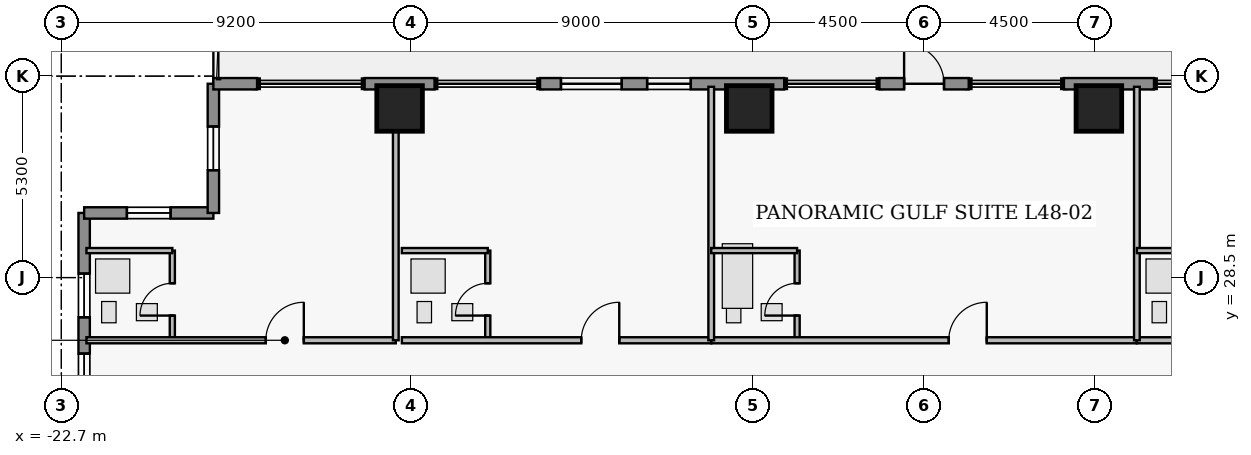
"""IFC4 building model, lengths in metres.
Left out: names, types, materials, properties, quantities, classifications, styles, units other than length and angle.
Written with IfcOpenShell. Run it as: python <this file> out.ifc"""

import sys

from ifc_helpers import new_model, si_unit, direction, frame, frame_2d, origin, origin_2d, place, context, subcontext, project, spatial, rectangle, extrude, element, fill, save


model = new_model("IFC4")
c1 = context("Model", 3, precision=1e-05, world=origin(), true_north=direction((0.0, 1.0)))
c2 = subcontext(c1, "Body", "Model", "MODEL_VIEW")
j1 = project(units=[si_unit("LENGTHUNIT", "METRE"), si_unit("PLANEANGLEUNIT", "RADIAN")], contexts=[c1])
p1 = place(None, origin())
s1 = spatial("IfcSite", under=j1, at=p1, CompositionType="ELEMENT")
p2 = place(p1, origin())
s2 = spatial("IfcBuilding", under=s1, at=p2, CompositionType="ELEMENT")
p3 = place(p2, frame((0.0, 0.0, 192.4)))
s3 = spatial("IfcBuildingStorey", under=s2, at=p3, CompositionType="ELEMENT", Elevation=192.4)
for number, where, z_axis, x_axis in (
    (1, (-13.8, 32.95, 0.0), (0.0, 0.0, 1.0), (1.0, 0.0, 0.0)),
    (2, (-4.6, 32.95, 0.0), (0.0, 0.0, 1.0), (1.0, 0.0, 0.0)),
    (3, (4.6, 32.95, 0.0), (0.0, 0.0, 1.0), (1.0, 0.0, 0.0)),
):
    element("IfcColumn", number, at=place(p3, frame(where, z_axis=z_axis, x_axis=x_axis)), inside=s3, PredefinedType="COLUMN", context=c2, shape_type="SweptSolid", body=[
        extrude(rectangle(XDim=1.2, YDim=1.2, at=origin_2d()), origin(), (0.0, 0.0, 1.0), 3.75),
    ])
p4 = place(p3, frame((-22.1, 24.55, 0.0), z_axis=(0.0, 0.0, 1.0), x_axis=(0.0, 1.0, 0.0)))
e4 = element("IfcWall", 4, at=p4, inside=s3, PredefinedType="STANDARD", context=c2, shape_type="SweptSolid", body=[
    extrude(rectangle(XDim=5.65, YDim=0.3, at=frame_2d((2.825, 0.0))), origin(), (0.0, 0.0, 1.0), 3.53),
])
p5 = place(p4, frame((0.8, 0.0, 0.95)))
e5 = element("IfcOpeningElement", 5, at=p5, cuts=e4, PredefinedType="OPENING", context=c2, shape_type="SweptSolid", body=[
    extrude(rectangle(XDim=1.15, YDim=1.55, at=frame_2d((0.575, 0.775))), frame((0.0, 0.16, 0.0), z_axis=(0.0, -1.0, 0.0), x_axis=(1.0, 0.0, 0.0)), (0.0, 0.0, 1.0), 0.32),
])
p6 = place(p4, frame((2.905, 0.0, 0.95)))
e6 = element("IfcOpeningElement", 6, at=p6, cuts=e4, PredefinedType="OPENING", context=c2, shape_type="SweptSolid", body=[
    extrude(rectangle(XDim=1.15, YDim=1.55, at=frame_2d((0.575, 0.775))), frame((0.0, 0.16, 0.0), z_axis=(0.0, -1.0, 0.0), x_axis=(1.0, 0.0, 0.0)), (0.0, 0.0, 1.0), 0.32),
])
p7 = place(p3, frame((-22.1, 30.2, 0.0), z_axis=(0.0, 0.0, 1.0), x_axis=(1.0, 0.0, 0.0)))
e7 = element("IfcWall", 7, at=p7, inside=s3, PredefinedType="STANDARD", context=c2, shape_type="SweptSolid", body=[
    extrude(rectangle(XDim=3.4, YDim=0.3, at=frame_2d((1.7, 0.0))), origin(), (0.0, 0.0, 1.0), 3.53),
])
p8 = place(p7, frame((1.125, 0.0, 1.25)))
e8 = element("IfcOpeningElement", 8, at=p8, cuts=e7, PredefinedType="OPENING", context=c2, shape_type="SweptSolid", body=[
    extrude(rectangle(XDim=1.15, YDim=1.55, at=frame_2d((0.575, 0.775))), frame((0.0, 0.16, 0.0), z_axis=(0.0, -1.0, 0.0), x_axis=(1.0, 0.0, 0.0)), (0.0, 0.0, 1.0), 0.32),
])
p9 = place(p3, frame((-18.7, 30.2, 0.0), z_axis=(0.0, 0.0, 1.0), x_axis=(0.0, 1.0, 0.0)))
e9 = element("IfcWall", 9, at=p9, inside=s3, PredefinedType="STANDARD", context=c2, shape_type="SweptSolid", body=[
    extrude(rectangle(XDim=3.4, YDim=0.3, at=frame_2d((1.7, 0.0))), origin(), (0.0, 0.0, 1.0), 3.53),
])
p10 = place(p9, frame((1.125, 0.0, 1.25)))
e10 = element("IfcOpeningElement", 10, at=p10, cuts=e9, PredefinedType="OPENING", context=c2, shape_type="SweptSolid", body=[
    extrude(rectangle(XDim=1.15, YDim=1.55, at=frame_2d((0.575, 0.775))), frame((0.0, 0.16, 0.0), z_axis=(0.0, -1.0, 0.0), x_axis=(1.0, 0.0, 0.0)), (0.0, 0.0, 1.0), 0.32),
])
p11 = place(p3, frame((-18.7, 33.6, 0.0), z_axis=(0.0, 0.0, 1.0), x_axis=(1.0, 0.0, 0.0)))
e11 = element("IfcWall", 11, at=p11, inside=s3, PredefinedType="STANDARD", context=c2, shape_type="SweptSolid", body=[
    extrude(rectangle(XDim=1.15, YDim=0.3, at=frame_2d((0.575, 0.0))), origin(), (0.0, 0.0, 1.0), 3.53),
])
p12 = place(p3, frame((-14.72, 33.6, 0.0), z_axis=(0.0, 0.0, 1.0), x_axis=(1.0, 0.0, 0.0)))
e12 = element("IfcWall", 12, at=p12, inside=s3, PredefinedType="STANDARD", context=c2, shape_type="SweptSolid", body=[
    extrude(rectangle(XDim=1.84, YDim=0.3, at=frame_2d((0.92, 0.0))), origin(), (0.0, 0.0, 1.0), 3.53),
])
p13 = place(p3, frame((-10.104, 33.6, 0.0), z_axis=(0.0, 0.0, 1.0), x_axis=(1.0, 0.0, 0.0)))
e13 = element("IfcWall", 13, at=p13, inside=s3, PredefinedType="STANDARD", context=c2, shape_type="SweptSolid", body=[
    extrude(rectangle(XDim=6.424, YDim=0.3, at=frame_2d((3.212, 0.0))), origin(), (0.0, 0.0, 1.0), 3.53),
])
p14 = place(p13, frame((0.55, 0.0, 0.85)))
e14 = element("IfcOpeningElement", 14, at=p14, cuts=e13, PredefinedType="OPENING", context=c2, shape_type="SweptSolid", body=[
    extrude(rectangle(XDim=1.6, YDim=1.8, at=frame_2d((0.8, 0.9))), frame((0.0, 0.16, 0.0), z_axis=(0.0, -1.0, 0.0), x_axis=(1.0, 0.0, 0.0)), (0.0, 0.0, 1.0), 0.32),
])
p15 = place(p13, frame((2.817, 0.0, 0.95)))
e15 = element("IfcOpeningElement", 15, at=p15, cuts=e13, PredefinedType="OPENING", context=c2, shape_type="SweptSolid", body=[
    extrude(rectangle(XDim=1.15, YDim=1.55, at=frame_2d((0.575, 0.775))), frame((0.0, 0.16, 0.0), z_axis=(0.0, -1.0, 0.0), x_axis=(1.0, 0.0, 0.0)), (0.0, 0.0, 1.0), 0.32),
])
p16 = place(p3, frame((-1.175, 33.6, 0.0), z_axis=(0.0, 0.0, 1.0), x_axis=(1.0, 0.0, 0.0)))
e16 = element("IfcWall", 16, at=p16, inside=s3, PredefinedType="STANDARD", context=c2, shape_type="SweptSolid", body=[
    extrude(rectangle(XDim=2.35, YDim=0.3, at=frame_2d((1.175, 0.0))), origin(), (0.0, 0.0, 1.0), 3.53),
])
p17 = place(p16, frame((0.65, 0.0, 0.0)))
e17 = element("IfcOpeningElement", 17, at=p17, cuts=e16, PredefinedType="OPENING", context=c2, shape_type="SweptSolid", body=[
    extrude(rectangle(XDim=1.05, YDim=2.2, at=frame_2d((0.525, 1.1))), frame((0.0, 0.16, 0.0), z_axis=(0.0, -1.0, 0.0), x_axis=(1.0, 0.0, 0.0)), (0.0, 0.0, 1.0), 0.32),
])
p18 = place(p3, frame((3.68, 33.6, 0.0), z_axis=(0.0, 0.0, 1.0), x_axis=(1.0, 0.0, 0.0)))
e18 = element("IfcWall", 18, at=p18, inside=s3, PredefinedType="STANDARD", context=c2, shape_type="SweptSolid", body=[
    extrude(rectangle(XDim=2.37, YDim=0.3, at=frame_2d((1.185, 0.0))), origin(), (0.0, 0.0, 1.0), 3.53),
])
p19 = place(p3, frame((-19.78, 26.85, 0.0), z_axis=(0.0, 0.0, 1.0), x_axis=(0.0, 1.0, 0.0)))
e19 = element("IfcWall", 19, at=p19, inside=s3, PredefinedType="PLUMBINGWALL", context=c2, shape_type="SweptSolid", body=[
    extrude(rectangle(XDim=2.36, YDim=0.135, at=frame_2d((1.18, 0.0))), origin(), (0.0, 0.0, 1.0), 3.53),
])
p20 = place(p19, frame((0.65, 0.0, 0.0)))
e20 = element("IfcOpeningElement", 20, at=p20, cuts=e19, PredefinedType="OPENING", context=c2, shape_type="SweptSolid", body=[
    extrude(rectangle(XDim=0.85, YDim=2.1, at=frame_2d((0.425, 1.05))), frame((0.0, 0.077, 0.0), z_axis=(0.0, -1.0, 0.0), x_axis=(1.0, 0.0, 0.0)), (0.0, 0.0, 1.0), 0.155),
])
p21 = place(p3, frame((-22.04, 26.85, 0.0), z_axis=(0.0, 0.0, 1.0), x_axis=(1.0, 0.0, 0.0)))
e21 = element("IfcWall", 21, at=p21, inside=s3, PredefinedType="PARTITIONING", context=c2, shape_type="SweptSolid", body=[
    extrude(rectangle(XDim=8.14, YDim=0.16, at=frame_2d((4.07, 0.0))), origin(), (0.0, 0.0, 1.0), 3.53),
])
p22 = place(p21, frame((4.72, 0.0, 0.0)))
e22 = element("IfcOpeningElement", 22, at=p22, cuts=e21, PredefinedType="OPENING", context=c2, shape_type="SweptSolid", body=[
    extrude(rectangle(XDim=1.0, YDim=2.15, at=frame_2d((0.5, 1.075))), frame((0.0, 0.09, 0.0), z_axis=(0.0, -1.0, 0.0), x_axis=(1.0, 0.0, 0.0)), (0.0, 0.0, 1.0), 0.18),
])
p23 = place(p3, frame((-11.48, 26.85, 0.0), z_axis=(0.0, 0.0, 1.0), x_axis=(0.0, 1.0, 0.0)))
e23 = element("IfcWall", 23, at=p23, inside=s3, PredefinedType="PLUMBINGWALL", context=c2, shape_type="SweptSolid", body=[
    extrude(rectangle(XDim=2.36, YDim=0.135, at=frame_2d((1.18, 0.0))), origin(), (0.0, 0.0, 1.0), 3.53),
])
p24 = place(p23, frame((0.65, 0.0, 0.0)))
e24 = element("IfcOpeningElement", 24, at=p24, cuts=e23, PredefinedType="OPENING", context=c2, shape_type="SweptSolid", body=[
    extrude(rectangle(XDim=0.85, YDim=2.1, at=frame_2d((0.425, 1.05))), frame((0.0, 0.077, 0.0), z_axis=(0.0, -1.0, 0.0), x_axis=(1.0, 0.0, 0.0)), (0.0, 0.0, 1.0), 0.155),
])
p25 = place(p3, frame((-13.74, 26.85, 0.0), z_axis=(0.0, 0.0, 1.0), x_axis=(1.0, 0.0, 0.0)))
e25 = element("IfcWall", 25, at=p25, inside=s3, PredefinedType="PARTITIONING", context=c2, shape_type="SweptSolid", body=[
    extrude(rectangle(XDim=8.14, YDim=0.16, at=frame_2d((4.07, 0.0))), origin(), (0.0, 0.0, 1.0), 3.53),
])
p26 = place(p25, frame((4.72, 0.0, 0.0)))
e26 = element("IfcOpeningElement", 26, at=p26, cuts=e25, PredefinedType="OPENING", context=c2, shape_type="SweptSolid", body=[
    extrude(rectangle(XDim=1.0, YDim=2.15, at=frame_2d((0.5, 1.075))), frame((0.0, 0.09, 0.0), z_axis=(0.0, -1.0, 0.0), x_axis=(1.0, 0.0, 0.0)), (0.0, 0.0, 1.0), 0.18),
])
p27 = place(p3, frame((-3.34, 26.85, 0.0), z_axis=(0.0, 0.0, 1.0), x_axis=(0.0, 1.0, 0.0)))
e27 = element("IfcWall", 27, at=p27, inside=s3, PredefinedType="PLUMBINGWALL", context=c2, shape_type="SweptSolid", body=[
    extrude(rectangle(XDim=2.36, YDim=0.135, at=frame_2d((1.18, 0.0))), origin(), (0.0, 0.0, 1.0), 3.53),
])
p28 = place(p27, frame((0.65, 0.0, 0.0)))
e28 = element("IfcOpeningElement", 28, at=p28, cuts=e27, PredefinedType="OPENING", context=c2, shape_type="SweptSolid", body=[
    extrude(rectangle(XDim=0.85, YDim=2.1, at=frame_2d((0.425, 1.05))), frame((0.0, 0.077, 0.0), z_axis=(0.0, -1.0, 0.0), x_axis=(1.0, 0.0, 0.0)), (0.0, 0.0, 1.0), 0.155),
])
p29 = place(p3, frame((-5.6, 26.85, 0.0), z_axis=(0.0, 0.0, 1.0), x_axis=(1.0, 0.0, 0.0)))
e29 = element("IfcWall", 29, at=p29, inside=s3, PredefinedType="PARTITIONING", context=c2, shape_type="SweptSolid", body=[
    extrude(rectangle(XDim=11.2, YDim=0.16, at=frame_2d((5.6, 0.0))), origin(), (0.0, 0.0, 1.0), 3.53),
])
p30 = place(p29, frame((6.25, 0.0, 0.0)))
e30 = element("IfcOpeningElement", 30, at=p30, cuts=e29, PredefinedType="OPENING", context=c2, shape_type="SweptSolid", body=[
    extrude(rectangle(XDim=1.0, YDim=2.15, at=frame_2d((0.5, 1.075))), frame((0.0, 0.09, 0.0), z_axis=(0.0, -1.0, 0.0), x_axis=(1.0, 0.0, 0.0)), (0.0, 0.0, 1.0), 0.18),
])
p31 = place(p3, frame((5.6, 26.85, 0.0), z_axis=(0.0, 0.0, 1.0), x_axis=(1.0, 0.0, 0.0)))
e31 = element("IfcWall", 31, at=p31, inside=s3, PredefinedType="PARTITIONING", context=c2, shape_type="SweptSolid", body=[
    extrude(rectangle(XDim=8.14, YDim=0.16, at=frame_2d((4.07, 0.0))), origin(), (0.0, 0.0, 1.0), 3.53),
])
p32 = place(p31, frame((4.72, 0.0, 0.0)))
e32 = element("IfcOpeningElement", 32, at=p32, cuts=e31, PredefinedType="OPENING", context=c2, shape_type="SweptSolid", body=[
    extrude(rectangle(XDim=1.0, YDim=2.15, at=frame_2d((0.5, 1.075))), frame((0.0, 0.09, 0.0), z_axis=(0.0, -1.0, 0.0), x_axis=(1.0, 0.0, 0.0)), (0.0, 0.0, 1.0), 0.18),
])
p33 = place(p3, frame((-22.04, 29.21, 0.0), z_axis=(0.0, 0.0, 1.0), x_axis=(1.0, 0.0, 0.0)))
e33 = element("IfcWall", 33, at=p33, inside=s3, PredefinedType="PLUMBINGWALL", context=c2, shape_type="SweptSolid", body=[
    extrude(rectangle(XDim=2.26, YDim=0.135, at=frame_2d((1.13, 0.0))), origin(), (0.0, 0.0, 1.0), 3.53),
])
p34 = place(p3, frame((-13.9, 26.85, 0.0), z_axis=(0.0, 0.0, 1.0), x_axis=(0.0, 1.0, 0.0)))
e34 = element("IfcWall", 34, at=p34, inside=s3, PredefinedType="PARTITIONING", context=c2, shape_type="SweptSolid", body=[
    extrude(rectangle(XDim=6.67, YDim=0.15, at=frame_2d((3.335, 0.0))), origin(), (0.0, 0.0, 1.0), 2.519),
])
p35 = place(p3, frame((-13.74, 29.21, 0.0), z_axis=(0.0, 0.0, 1.0), x_axis=(1.0, 0.0, 0.0)))
e35 = element("IfcWall", 35, at=p35, inside=s3, PredefinedType="PLUMBINGWALL", context=c2, shape_type="SweptSolid", body=[
    extrude(rectangle(XDim=2.26, YDim=0.135, at=frame_2d((1.13, 0.0))), origin(), (0.0, 0.0, 1.0), 3.53),
])
p36 = place(p3, frame((-5.6, 26.85, 0.0), z_axis=(0.0, 0.0, 1.0), x_axis=(0.0, 1.0, 0.0)))
e36 = element("IfcWall", 36, at=p36, inside=s3, PredefinedType="PARTITIONING", context=c2, shape_type="SweptSolid", body=[
    extrude(rectangle(XDim=6.67, YDim=0.15, at=frame_2d((3.335, 0.0))), origin(), (0.0, 0.0, 1.0), 3.53),
])
p37 = place(p3, frame((-5.6, 29.21, 0.0), z_axis=(0.0, 0.0, 1.0), x_axis=(1.0, 0.0, 0.0)))
e37 = element("IfcWall", 37, at=p37, inside=s3, PredefinedType="PLUMBINGWALL", context=c2, shape_type="SweptSolid", body=[
    extrude(rectangle(XDim=2.26, YDim=0.135, at=frame_2d((1.13, 0.0))), origin(), (0.0, 0.0, 1.0), 3.53),
])
p38 = place(p3, frame((5.6, 26.85, 0.0), z_axis=(0.0, 0.0, 1.0), x_axis=(0.0, 1.0, 0.0)))
e38 = element("IfcWall", 38, at=p38, inside=s3, PredefinedType="PARTITIONING", context=c2, shape_type="SweptSolid", body=[
    extrude(rectangle(XDim=6.67, YDim=0.15, at=frame_2d((3.335, 0.0))), origin(), (0.0, 0.0, 1.0), 3.53),
])
p39 = place(p3, frame((5.6, 29.21, 0.0), z_axis=(0.0, 0.0, 1.0), x_axis=(1.0, 0.0, 0.0)))
e39 = element("IfcWall", 39, at=p39, inside=s3, PredefinedType="PLUMBINGWALL", context=c2, shape_type="SweptSolid", body=[
    extrude(rectangle(XDim=2.26, YDim=0.135, at=frame_2d((1.13, 0.0))), origin(), (0.0, 0.0, 1.0), 3.53),
])
p40 = place(p5, origin())
e40 = element("IfcWindow", 40, at=p40, inside=s3, PartitioningType="SINGLE_PANEL", PredefinedType="WINDOW", context=c2, shape_type="SweptSolid", body=[
    extrude(rectangle(XDim=1.15, YDim=1.55, at=frame_2d((0.575, 0.775))), frame((0.0, 0.03, 0.0), z_axis=(0.0, -1.0, 0.0), x_axis=(1.0, 0.0, 0.0)), (0.0, 0.0, 1.0), 0.06),
])
fill(e5, e40)
p41 = place(p6, origin())
e41 = element("IfcWindow", 41, at=p41, inside=s3, PartitioningType="SINGLE_PANEL", PredefinedType="WINDOW", context=c2, shape_type="SweptSolid", body=[
    extrude(rectangle(XDim=1.15, YDim=1.55, at=frame_2d((0.575, 0.775))), frame((0.0, 0.03, 0.0), z_axis=(0.0, -1.0, 0.0), x_axis=(1.0, 0.0, 0.0)), (0.0, 0.0, 1.0), 0.06),
])
fill(e6, e41)
p42 = place(p8, origin())
e42 = element("IfcWindow", 42, at=p42, inside=s3, PartitioningType="SINGLE_PANEL", PredefinedType="WINDOW", context=c2, shape_type="SweptSolid", body=[
    extrude(rectangle(XDim=1.15, YDim=1.55, at=frame_2d((0.575, 0.775))), frame((0.0, 0.03, 0.0), z_axis=(0.0, -1.0, 0.0), x_axis=(1.0, 0.0, 0.0)), (0.0, 0.0, 1.0), 0.06),
])
fill(e8, e42)
p43 = place(p10, origin())
e43 = element("IfcWindow", 43, at=p43, inside=s3, PartitioningType="SINGLE_PANEL", PredefinedType="WINDOW", context=c2, shape_type="SweptSolid", body=[
    extrude(rectangle(XDim=1.15, YDim=1.55, at=frame_2d((0.575, 0.775))), frame((0.0, 0.03, 0.0), z_axis=(0.0, -1.0, 0.0), x_axis=(1.0, 0.0, 0.0)), (0.0, 0.0, 1.0), 0.06),
])
fill(e10, e43)
p44 = place(p14, origin())
e44 = element("IfcWindow", 44, at=p44, inside=s3, PartitioningType="SINGLE_PANEL", PredefinedType="WINDOW", context=c2, shape_type="SweptSolid", body=[
    extrude(rectangle(XDim=1.6, YDim=1.8, at=frame_2d((0.8, 0.9))), frame((0.0, 0.03, 0.0), z_axis=(0.0, -1.0, 0.0), x_axis=(1.0, 0.0, 0.0)), (0.0, 0.0, 1.0), 0.06),
])
fill(e14, e44)
p45 = place(p15, origin())
e45 = element("IfcWindow", 45, at=p45, inside=s3, PartitioningType="SINGLE_PANEL", PredefinedType="WINDOW", context=c2, shape_type="SweptSolid", body=[
    extrude(rectangle(XDim=1.15, YDim=1.55, at=frame_2d((0.575, 0.775))), frame((0.0, 0.03, 0.0), z_axis=(0.0, -1.0, 0.0), x_axis=(1.0, 0.0, 0.0)), (0.0, 0.0, 1.0), 0.06),
])
fill(e15, e45)
p46 = place(p17, origin())
e46 = element("IfcDoor", 46, at=p46, inside=s3, OperationType="SINGLE_SWING_LEFT", PredefinedType="DOOR", context=c2, shape_type="SweptSolid", body=[
    extrude(rectangle(XDim=1.05, YDim=2.2, at=frame_2d((0.525, 1.1))), frame((0.0, 0.025, 0.0), z_axis=(0.0, -1.0, 0.0), x_axis=(1.0, 0.0, 0.0)), (0.0, 0.0, 1.0), 0.05),
])
fill(e17, e46)
p47 = place(p20, origin())
e47 = element("IfcDoor", 47, at=p47, inside=s3, OperationType="SINGLE_SWING_LEFT", PredefinedType="DOOR", context=c2, shape_type="SweptSolid", body=[
    extrude(rectangle(XDim=0.85, YDim=2.1, at=frame_2d((0.425, 1.05))), frame((0.0, 0.025, 0.0), z_axis=(0.0, -1.0, 0.0), x_axis=(1.0, 0.0, 0.0)), (0.0, 0.0, 1.0), 0.05),
])
fill(e20, e47)
p48 = place(p22, origin())
e48 = element("IfcDoor", 48, at=p48, inside=s3, OperationType="SINGLE_SWING_RIGHT", PredefinedType="DOOR", context=c2, shape_type="SweptSolid", body=[
    extrude(rectangle(XDim=1.0, YDim=2.15, at=frame_2d((0.5, 1.075))), frame((0.0, 0.025, 0.0), z_axis=(0.0, -1.0, 0.0), x_axis=(1.0, 0.0, 0.0)), (0.0, 0.0, 1.0), 0.05),
])
fill(e22, e48)
p49 = place(p24, origin())
e49 = element("IfcDoor", 49, at=p49, inside=s3, OperationType="SINGLE_SWING_LEFT", PredefinedType="DOOR", context=c2, shape_type="SweptSolid", body=[
    extrude(rectangle(XDim=0.85, YDim=2.1, at=frame_2d((0.425, 1.05))), frame((0.0, 0.025, 0.0), z_axis=(0.0, -1.0, 0.0), x_axis=(1.0, 0.0, 0.0)), (0.0, 0.0, 1.0), 0.05),
])
fill(e24, e49)
p50 = place(p26, origin())
e50 = element("IfcDoor", 50, at=p50, inside=s3, OperationType="SINGLE_SWING_RIGHT", PredefinedType="DOOR", context=c2, shape_type="SweptSolid", body=[
    extrude(rectangle(XDim=1.0, YDim=2.15, at=frame_2d((0.5, 1.075))), frame((0.0, 0.025, 0.0), z_axis=(0.0, -1.0, 0.0), x_axis=(1.0, 0.0, 0.0)), (0.0, 0.0, 1.0), 0.05),
])
fill(e26, e50)
p51 = place(p28, origin())
e51 = element("IfcDoor", 51, at=p51, inside=s3, OperationType="SINGLE_SWING_LEFT", PredefinedType="DOOR", context=c2, shape_type="SweptSolid", body=[
    extrude(rectangle(XDim=0.85, YDim=2.1, at=frame_2d((0.425, 1.05))), frame((0.0, 0.025, 0.0), z_axis=(0.0, -1.0, 0.0), x_axis=(1.0, 0.0, 0.0)), (0.0, 0.0, 1.0), 0.05),
])
fill(e28, e51)
p52 = place(p30, origin())
e52 = element("IfcDoor", 52, at=p52, inside=s3, OperationType="SINGLE_SWING_RIGHT", PredefinedType="DOOR", context=c2, shape_type="SweptSolid", body=[
    extrude(rectangle(XDim=1.0, YDim=2.15, at=frame_2d((0.5, 1.075))), frame((0.0, 0.025, 0.0), z_axis=(0.0, -1.0, 0.0), x_axis=(1.0, 0.0, 0.0)), (0.0, 0.0, 1.0), 0.05),
])
fill(e30, e52)
save(model, sys.argv[1])
